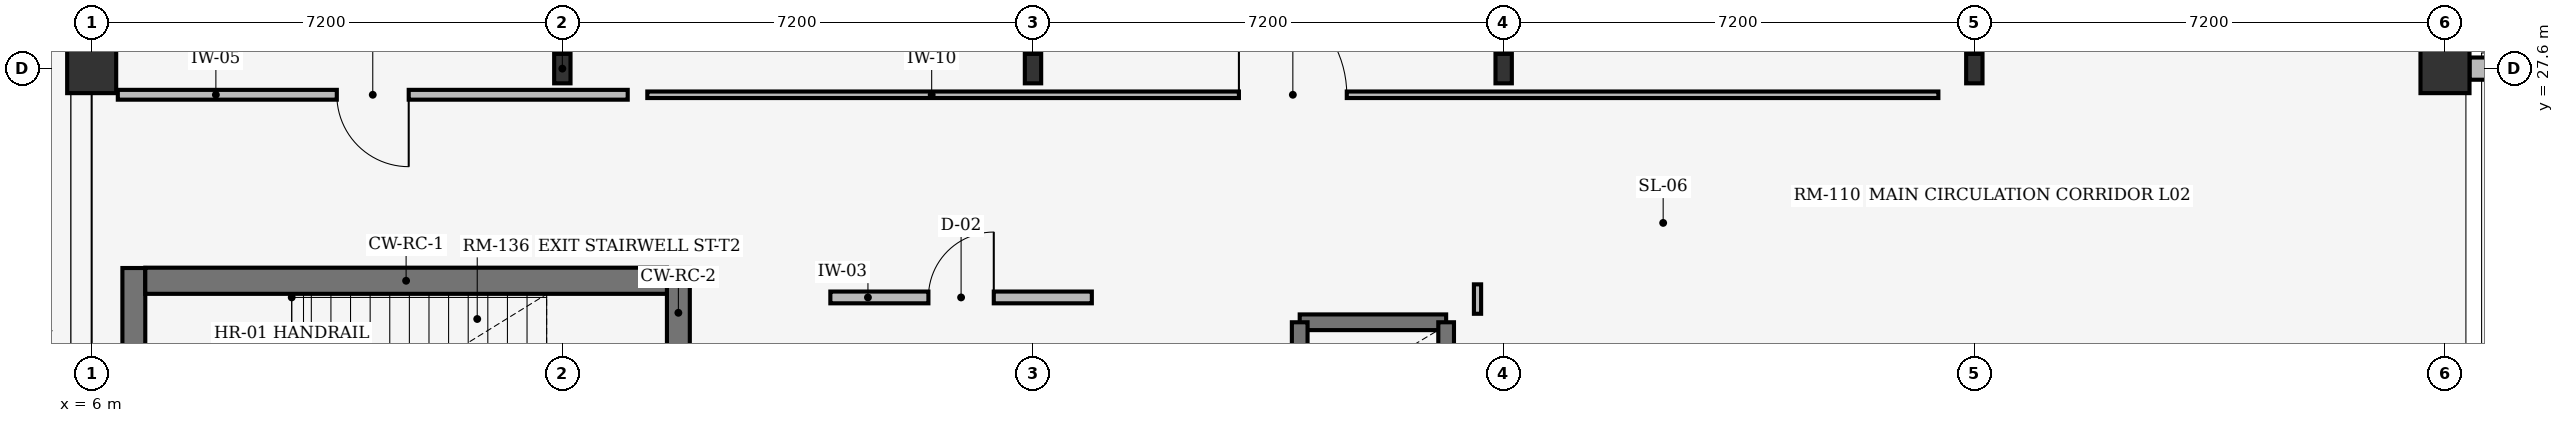
"""IFC4 building model, lengths in metres.
Left out: names, types, materials, properties, quantities, classifications, styles, units other than length and angle.
Written with IfcOpenShell. Run it as: python <this file> out.ifc"""

import sys

from ifc_helpers import new_model, si_unit, direction, frame, frame_2d, origin, origin_2d, place, context, subcontext, project, spatial, rectangle, i_section, extrude, element, fill, save


model = new_model("IFC4")
c1 = context("Model", 3, precision=1e-05, world=origin(), true_north=direction((0.0, 1.0)))
c2 = subcontext(c1, "Body", "Model", "MODEL_VIEW")
j1 = project(units=[si_unit("LENGTHUNIT", "METRE"), si_unit("PLANEANGLEUNIT", "RADIAN")], contexts=[c1])
p1 = place(None, origin())
s1 = spatial("IfcSite", under=j1, at=p1, CompositionType="ELEMENT")
p2 = place(p1, origin())
s2 = spatial("IfcBuilding", under=s1, at=p2, CompositionType="ELEMENT")
p3 = place(p2, frame((0.0, 0.0, 9.0)))
s3 = spatial("IfcBuildingStorey", under=s2, at=p3, CompositionType="ELEMENT", Elevation=9.0)
p4 = place(p3, frame((6.0, 27.6, 0.0), z_axis=(0.0, 0.0, 1.0), x_axis=(1.0, 0.0, 0.0)))
e1 = element("IfcColumn", 1, at=p4, inside=s3, PredefinedType="COLUMN", context=c2, shape_type="SweptSolid", body=[
    extrude(rectangle(XDim=0.75, YDim=0.75, at=origin_2d()), origin(), (0.0, 0.0, 1.0), 3.96),
])
for number, where, z_axis, x_axis in (
    (2, (13.2, 27.6, 0.0), (0.0, 0.0, 1.0), (1.0, 0.0, 0.0)),
    (3, (20.4, 27.6, 0.0), (0.0, 0.0, 1.0), (1.0, 0.0, 0.0)),
    (4, (27.6, 27.6, 0.0), (0.0, 0.0, 1.0), (1.0, 0.0, 0.0)),
    (5, (34.8, 27.6, 0.0), (0.0, 0.0, 1.0), (1.0, 0.0, 0.0)),
):
    element("IfcColumn", number, at=place(p3, frame(where, z_axis=z_axis, x_axis=x_axis)), inside=s3, PredefinedType="COLUMN", context=c2, shape_type="SweptSolid", body=[
        extrude(i_section(OverallWidth=0.25, OverallDepth=0.45, WebThickness=0.011, FlangeThickness=0.014, at=origin_2d()), origin(), (0.0, 0.0, 1.0), 3.96),
    ])
p5 = place(p3, frame((42.0, 27.6, 0.0), z_axis=(0.0, 0.0, 1.0), x_axis=(1.0, 0.0, 0.0)))
e6 = element("IfcColumn", 6, at=p5, inside=s3, PredefinedType="COLUMN", context=c2, shape_type="SweptSolid", body=[
    extrude(rectangle(XDim=0.75, YDim=0.75, at=origin_2d()), origin(), (0.0, 0.0, 1.0), 3.96),
])
p6 = place(p3, frame((42.375, 27.6, 0.0), z_axis=(0.0, 0.0, 1.0), x_axis=(1.0, 0.0, 0.0)))
e7 = element("IfcWall", 7, at=p6, inside=s3, PredefinedType="STANDARD", context=c2, shape_type="SweptSolid", body=[
    extrude(rectangle(XDim=6.7, YDim=0.34, at=frame_2d((3.35, 0.0))), origin(), (0.0, 0.0, 1.0), 3.42),
])
p7 = place(p6, frame((2.575, 0.0, 0.75)))
e8 = element("IfcOpeningElement", 8, at=p7, cuts=e7, PredefinedType="OPENING", context=c2, shape_type="SweptSolid", body=[
    extrude(rectangle(XDim=1.55, YDim=1.35, at=frame_2d((0.775, 0.675))), frame((0.0, 0.18, 0.0), z_axis=(0.0, -1.0, 0.0), x_axis=(1.0, 0.0, 0.0)), (0.0, 0.0, 1.0), 0.36),
])
p8 = place(p3, frame((14.975, 24.55, 0.0), z_axis=(0.0, 0.0, 1.0), x_axis=(0.0, -1.0, 0.0)))
e9 = element("IfcWall", 9, at=p8, inside=s3, PredefinedType="SHEAR", context=c2, shape_type="SweptSolid", body=[
    extrude(rectangle(XDim=4.59, YDim=0.35, at=frame_2d((2.295, 0.0))), origin(), (0.0, 0.0, 1.0), 3.96),
])
p9 = place(p8, frame((1.72, 0.0, 0.0)))
e10 = element("IfcOpeningElement", 10, at=p9, cuts=e9, PredefinedType="OPENING", context=c2, shape_type="SweptSolid", body=[
    extrude(rectangle(XDim=1.15, YDim=2.2, at=frame_2d((0.575, 1.1))), frame((0.0, 0.185, 0.0), z_axis=(0.0, -1.0, 0.0), x_axis=(1.0, 0.0, 0.0)), (0.0, 0.0, 1.0), 0.37),
])
p10 = place(p3, frame((6.645, 24.55, 0.0), z_axis=(0.0, 0.0, 1.0), x_axis=(0.0, -1.0, 0.0)))
e11 = element("IfcWall", 11, at=p10, inside=s3, PredefinedType="SHEAR", context=c2, shape_type="SweptSolid", body=[
    extrude(rectangle(XDim=4.59, YDim=0.35, at=frame_2d((2.295, 0.0))), origin(), (0.0, 0.0, 1.0), 3.96),
])
p11 = place(p3, frame((14.8, 24.355, 0.0), z_axis=(0.0, 0.0, 1.0), x_axis=(-1.0, 0.0, 0.0)))
e12 = element("IfcWall", 12, at=p11, inside=s3, PredefinedType="SHEAR", context=c2, shape_type="SweptSolid", body=[
    extrude(rectangle(XDim=7.98, YDim=0.4, at=frame_2d((3.99, 0.0))), origin(), (0.0, 0.0, 1.0), 3.96),
])
p12 = place(p3, frame((24.48, 23.72, 0.0), z_axis=(0.0, 0.0, 1.0), x_axis=(1.0, 0.0, 0.0)))
e13 = element("IfcWall", 13, at=p12, inside=s3, PredefinedType="SHEAR", context=c2, shape_type="SweptSolid", body=[
    extrude(rectangle(XDim=2.24, YDim=0.24, at=frame_2d((1.12, 0.0))), origin(), (0.0, 0.0, 1.0), 3.96),
])
for number, where, z_axis, x_axis in (
    (14, (24.48, 20.78, 0.0), (0.0, 0.0, 1.0), (0.0, 1.0, 0.0)),
    (15, (26.72, 20.78, 0.0), (0.0, 0.0, 1.0), (0.0, 1.0, 0.0)),
):
    element("IfcWall", number, at=place(p3, frame(where, z_axis=z_axis, x_axis=x_axis)), inside=s3, PredefinedType="SHEAR", context=c2, shape_type="SweptSolid", body=[
        extrude(rectangle(XDim=2.94, YDim=0.24, at=frame_2d((1.47, 0.0))), origin(), (0.0, 0.0, 1.0), 3.96),
    ])
p13 = place(p3, frame((17.3, 24.1, 0.0), z_axis=(0.0, 0.0, 1.0), x_axis=(1.0, 0.0, 0.0)))
e16 = element("IfcWall", 16, at=p13, inside=s3, PredefinedType="PARTITIONING", context=c2, shape_type="SweptSolid", body=[
    extrude(rectangle(XDim=4.0, YDim=0.18, at=frame_2d((2.0, 0.0))), origin(), (0.0, 0.0, 1.0), 3.94),
])
p14 = place(p13, frame((1.5, 0.0, 0.0)))
e17 = element("IfcOpeningElement", 17, at=p14, cuts=e16, PredefinedType="OPENING", context=c2, shape_type="SweptSolid", body=[
    extrude(rectangle(XDim=1.0, YDim=2.15, at=frame_2d((0.5, 1.075))), frame((0.0, 0.1, 0.0), z_axis=(0.0, -1.0, 0.0), x_axis=(1.0, 0.0, 0.0)), (0.0, 0.0, 1.0), 0.2),
])
p15 = place(p3, frame((6.4, 27.2, 0.0), z_axis=(0.0, 0.0, 1.0), x_axis=(1.0, 0.0, 0.0)))
e18 = element("IfcWall", 18, at=p15, inside=s3, PredefinedType="PARTITIONING", context=c2, shape_type="SweptSolid", body=[
    extrude(rectangle(XDim=7.8, YDim=0.15, at=frame_2d((3.9, 0.0))), origin(), (0.0, 0.0, 1.0), 3.94),
])
p16 = place(p15, frame((3.35, 0.0, 0.0)))
e19 = element("IfcOpeningElement", 19, at=p16, cuts=e18, PredefinedType="OPENING", context=c2, shape_type="SweptSolid", body=[
    extrude(rectangle(XDim=1.1, YDim=2.2, at=frame_2d((0.55, 1.1))), frame((0.0, 0.085, 0.0), z_axis=(0.0, -1.0, 0.0), x_axis=(1.0, 0.0, 0.0)), (0.0, 0.0, 1.0), 0.17),
])
p17 = place(p3, frame((27.2, 24.3, 0.0), z_axis=(0.0, 0.0, 1.0), x_axis=(0.0, -1.0, 0.0)))
e20 = element("IfcWall", 20, at=p17, inside=s3, PredefinedType="PARTITIONING", context=c2, shape_type="SweptSolid", body=[
    extrude(rectangle(XDim=0.45, YDim=0.11, at=frame_2d((0.225, 0.0))), origin(), (0.0, 0.0, 1.0), 3.94),
])
p18 = place(p3, frame((14.5, 27.2, 0.0), z_axis=(0.0, 0.0, 1.0), x_axis=(1.0, 0.0, 0.0)))
e21 = element("IfcWall", 21, at=p18, inside=s3, PredefinedType="PARTITIONING", context=c2, shape_type="SweptSolid", body=[
    extrude(rectangle(XDim=19.75, YDim=0.1, at=frame_2d((9.875, 0.0))), origin(), (0.0, 0.0, 1.0), 3.94),
])
p19 = place(p18, frame((9.05, 0.0, 0.0)))
e22 = element("IfcOpeningElement", 22, at=p19, cuts=e21, PredefinedType="OPENING", context=c2, shape_type="SweptSolid", body=[
    extrude(rectangle(XDim=1.65, YDim=2.25, at=frame_2d((0.825, 1.125))), frame((0.0, 0.06, 0.0), z_axis=(0.0, -1.0, 0.0), x_axis=(1.0, 0.0, 0.0)), (0.0, 0.0, 1.0), 0.12),
])
p20 = place(p14, frame((1.0, 0.0, 0.0), z_axis=(0.0, 0.0, 1.0), x_axis=(-1.0, 0.0, 0.0)))
e23 = element("IfcDoor", 23, at=p20, inside=s3, OperationType="SINGLE_SWING_RIGHT", PredefinedType="DOOR", context=c2, shape_type="SweptSolid", body=[
    extrude(rectangle(XDim=1.0, YDim=2.15, at=frame_2d((0.5, 1.075))), frame((0.0, 0.025, 0.0), z_axis=(0.0, -1.0, 0.0), x_axis=(1.0, 0.0, 0.0)), (0.0, 0.0, 1.0), 0.05),
])
fill(e17, e23)
p21 = place(p16, origin())
e24 = element("IfcDoor", 24, at=p21, inside=s3, OperationType="SINGLE_SWING_RIGHT", PredefinedType="DOOR", context=c2, shape_type="SweptSolid", body=[
    extrude(rectangle(XDim=1.1, YDim=2.2, at=frame_2d((0.55, 1.1))), frame((0.0, 0.025, 0.0), z_axis=(0.0, -1.0, 0.0), x_axis=(1.0, 0.0, 0.0)), (0.0, 0.0, 1.0), 0.05),
])
fill(e19, e24)
p22 = place(p19, origin())
e25 = element("IfcDoor", 25, at=p22, inside=s3, OperationType="DOUBLE_DOOR_SINGLE_SWING", PredefinedType="DOOR", context=c2, shape_type="SweptSolid", body=[
    extrude(rectangle(XDim=1.65, YDim=2.25, at=frame_2d((0.825, 1.125))), frame((0.0, 0.025, 0.0), z_axis=(0.0, -1.0, 0.0), x_axis=(1.0, 0.0, 0.0)), (0.0, 0.0, 1.0), 0.05),
])
fill(e22, e25)
save(model, sys.argv[1])
